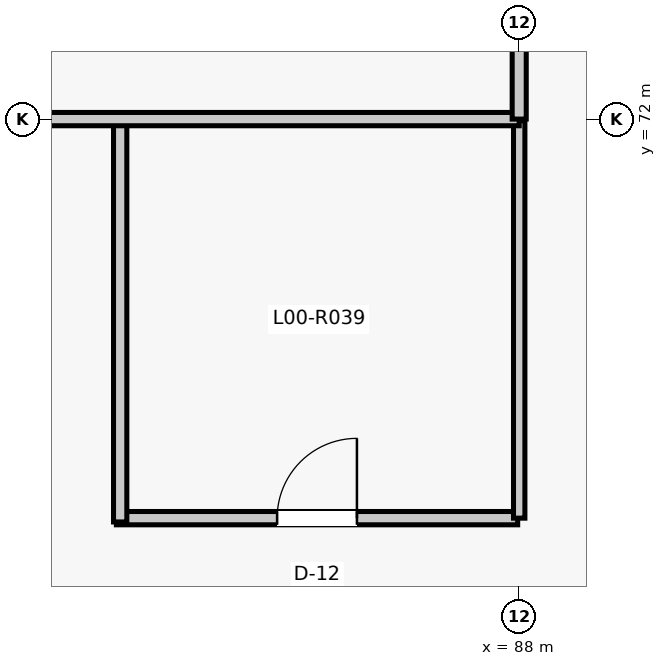
"""IFC4 building model, lengths in metres.
Left out: names, types, materials, properties, quantities, classifications, styles, units other than length and angle.
Written with IfcOpenShell. Run it as: python <this file> out.ifc"""

import sys

from ifc_helpers import new_model, si_unit, direction, frame, frame_2d, origin, place, context, subcontext, project, spatial, rectangle, extrude, element, fill, save


model = new_model("IFC4")
c1 = context("Model", 3, precision=1e-05, world=origin(), true_north=direction((0.0, 1.0)))
c2 = subcontext(c1, "Body", "Model", "MODEL_VIEW")
j1 = project(units=[si_unit("LENGTHUNIT", "METRE"), si_unit("PLANEANGLEUNIT", "RADIAN")], contexts=[c1])
p1 = place(None, origin())
s1 = spatial("IfcSite", under=j1, at=p1, CompositionType="ELEMENT")
p2 = place(p1, origin())
s2 = spatial("IfcBuilding", under=s1, at=p2, CompositionType="ELEMENT")
p3 = place(p2, origin())
s3 = spatial("IfcBuildingStorey", under=s2, at=p3, CompositionType="ELEMENT", Elevation=0.0)
p4 = place(p3, frame((82.7, 66.75, 0.0), z_axis=(0.0, 0.0, 1.0), x_axis=(1.0, 0.0, 0.0)))
e1 = element("IfcWall", 1, at=p4, inside=s3, PredefinedType="PARTITIONING", context=c2, shape_type="SweptSolid", body=[
    extrude(rectangle(XDim=5.28, YDim=0.175, at=frame_2d((2.64, 0.0))), origin(), (0.0, 0.0, 1.0), 5.025),
])
p5 = place(p4, frame((2.115, 0.0, 0.0)))
e2 = element("IfcOpeningElement", 2, at=p5, cuts=e1, PredefinedType="OPENING", context=c2, shape_type="SweptSolid", body=[
    extrude(rectangle(XDim=1.05, YDim=2.15, at=frame_2d((0.525, 1.075))), frame((0.0, 0.097, 0.0), z_axis=(0.0, -1.0, 0.0), x_axis=(1.0, 0.0, 0.0)), (0.0, 0.0, 1.0), 0.195),
])
p6 = place(p3, frame((82.75, 66.7, 0.0), z_axis=(0.0, 0.0, 1.0), x_axis=(0.0, 1.0, 0.0)))
e3 = element("IfcWall", 3, at=p6, inside=s3, PredefinedType="PARTITIONING", context=c2, shape_type="SweptSolid", body=[
    extrude(rectangle(XDim=5.28, YDim=0.175, at=frame_2d((2.64, 0.0))), origin(), (0.0, 0.0, 1.0), 4.262),
])
p7 = place(p3, frame((88.0, 66.75, 0.0), z_axis=(0.0, 0.0, 1.0), x_axis=(0.0, 1.0, 0.0)))
e4 = element("IfcWall", 4, at=p7, inside=s3, PredefinedType="PARTITIONING", context=c2, shape_type="SweptSolid", body=[
    extrude(rectangle(XDim=5.23, YDim=0.15, at=frame_2d((2.615, 0.0))), origin(), (0.0, 0.0, 1.0), 4.262),
])
p8 = place(p3, frame((80.189, 72.0, 0.0), z_axis=(0.0, 0.0, 1.0), x_axis=(1.0, 0.0, 0.0)))
e5 = element("IfcWall", 5, at=p8, inside=s3, PredefinedType="PARTITIONING", context=c2, shape_type="SweptSolid", body=[
    extrude(rectangle(XDim=7.811, YDim=0.175, at=frame_2d((3.906, 0.0))), origin(), (0.0, 0.0, 1.0), 4.262),
])
p9 = place(p8, frame((0.52, 0.0, 0.0)))
e6 = element("IfcOpeningElement", 6, at=p9, cuts=e5, PredefinedType="OPENING", context=c2, shape_type="SweptSolid", body=[
    extrude(rectangle(XDim=0.94, YDim=2.12, at=frame_2d((0.47, 1.06))), frame((0.0, 0.097, 0.0), z_axis=(0.0, -1.0, 0.0), x_axis=(1.0, 0.0, 0.0)), (0.0, 0.0, 1.0), 0.195),
])
p10 = place(p3, frame((88.0, 72.0, 0.0), z_axis=(0.0, 0.0, 1.0), x_axis=(0.0, 1.0, 0.0)))
e7 = element("IfcWall", 7, at=p10, inside=s3, PredefinedType="PARTITIONING", context=c2, shape_type="SweptSolid", body=[
    extrude(rectangle(XDim=7.66, YDim=0.185, at=frame_2d((3.83, 0.0))), origin(), (0.0, 0.0, 1.0), 4.262),
])
p11 = place(p5, origin())
e8 = element("IfcDoor", 8, at=p11, inside=s3, OperationType="SINGLE_SWING_RIGHT", PredefinedType="DOOR", context=c2, shape_type="SweptSolid", body=[
    extrude(rectangle(XDim=1.05, YDim=2.15, at=frame_2d((0.525, 1.075))), frame((0.0, 0.025, 0.0), z_axis=(0.0, -1.0, 0.0), x_axis=(1.0, 0.0, 0.0)), (0.0, 0.0, 1.0), 0.05),
])
fill(e2, e8)
save(model, sys.argv[1])
